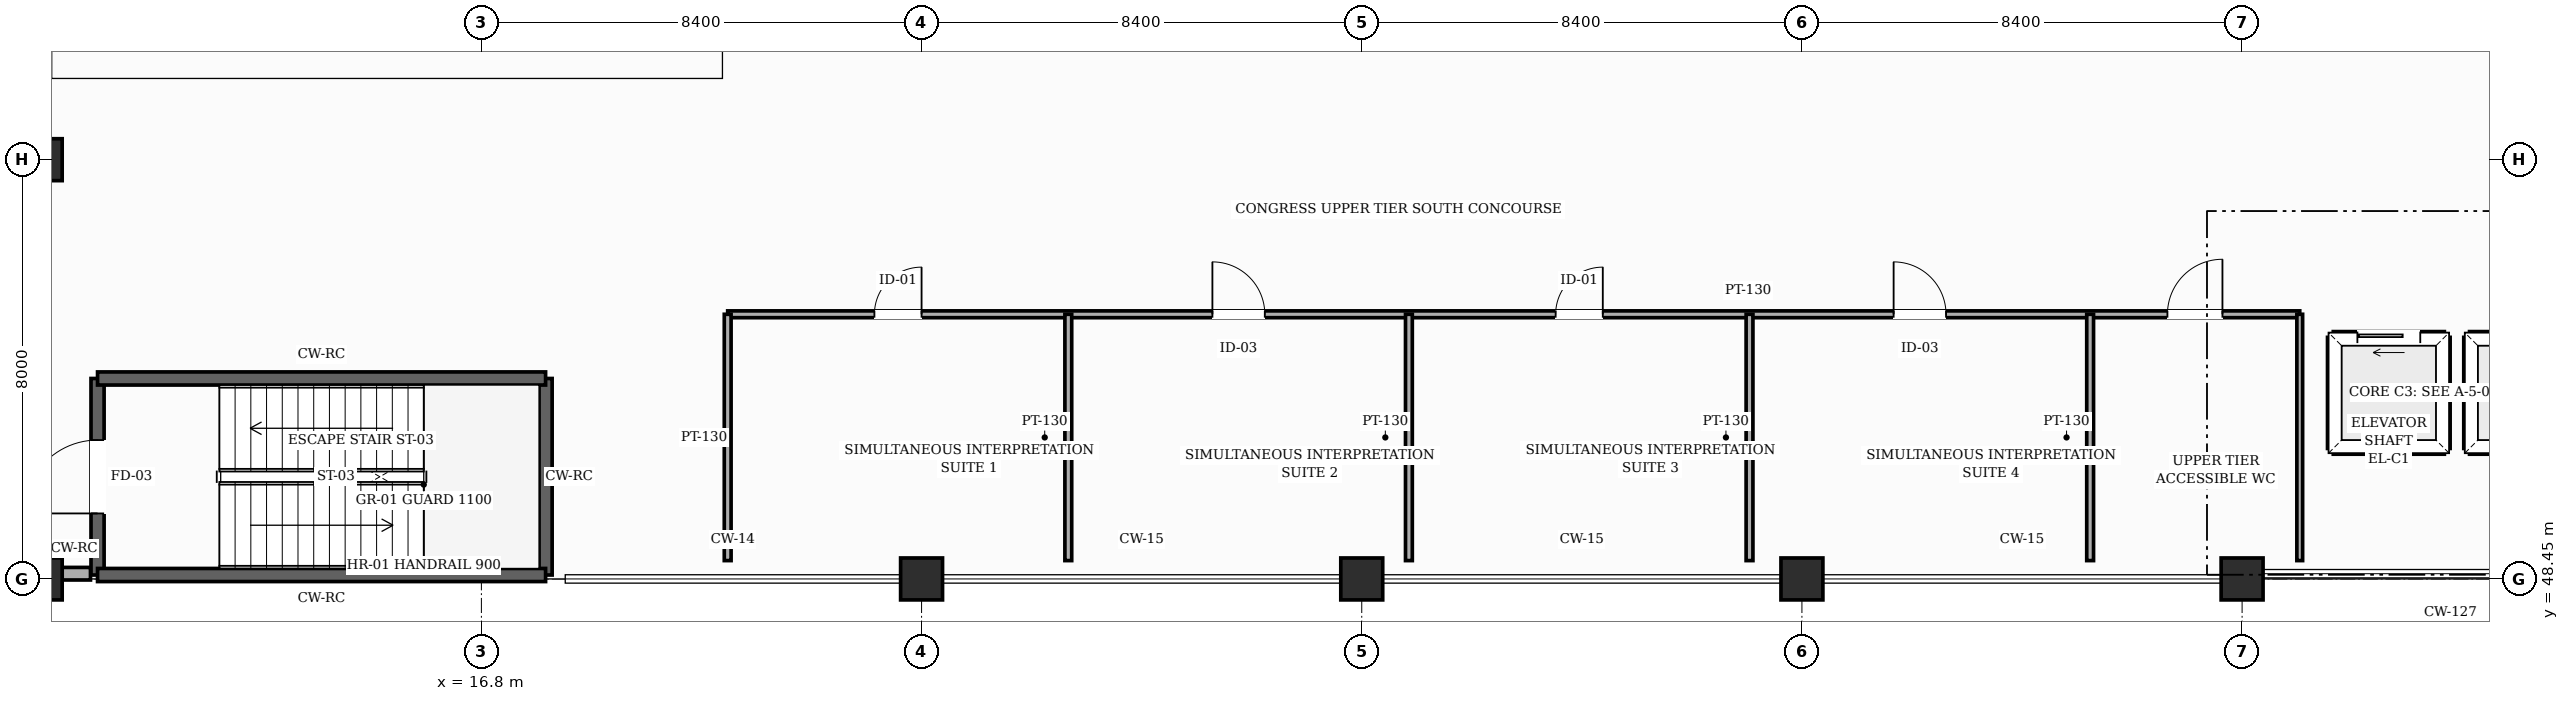
"""IFC4 building model, lengths in metres.
Left out: names, types, materials, properties, quantities, classifications, styles, units other than length and angle.
Written with IfcOpenShell. Run it as: python <this file> out.ifc"""

import sys

from ifc_helpers import new_model, si_unit, direction, frame, frame_2d, origin, origin_2d, place, context, subcontext, project, spatial, rectangle, hollow_rectangle, extrude, element, fill, save


model = new_model("IFC4")
c1 = context("Model", 3, precision=1e-05, world=origin(), true_north=direction((0.0, 1.0)))
c2 = subcontext(c1, "Body", "Model", "MODEL_VIEW")
j1 = project(units=[si_unit("LENGTHUNIT", "METRE"), si_unit("PLANEANGLEUNIT", "RADIAN")], contexts=[c1])
p1 = place(None, origin())
s1 = spatial("IfcSite", under=j1, at=p1, CompositionType="ELEMENT")
p2 = place(p1, origin())
s2 = spatial("IfcBuilding", under=s1, at=p2, CompositionType="ELEMENT")
p3 = place(p2, frame((0.0, 0.0, 10.2)))
s3 = spatial("IfcBuildingStorey", under=s2, at=p3, CompositionType="ELEMENT", Elevation=10.2)
for number, where, z_axis, x_axis in (
    (1, (8.4, 48.45, 0.0), (0.0, 0.0, 1.0), (1.0, 0.0, 0.0)),
    (2, (8.4, 56.45, 0.0), (0.0, 0.0, 1.0), (1.0, 0.0, 0.0)),
    (3, (25.2, 48.45, 0.0), (0.0, 0.0, 1.0), (1.0, 0.0, 0.0)),
    (4, (33.6, 48.45, 0.0), (0.0, 0.0, 1.0), (1.0, 0.0, 0.0)),
    (5, (42.0, 48.45, 0.0), (0.0, 0.0, 1.0), (1.0, 0.0, 0.0)),
    (6, (50.4, 48.45, 0.0), (0.0, 0.0, 1.0), (1.0, 0.0, 0.0)),
):
    element("IfcColumn", number, at=place(p3, frame(where, z_axis=z_axis, x_axis=x_axis)), inside=s3, PredefinedType="COLUMN", context=c2, shape_type="SweptSolid", body=[
        extrude(hollow_rectangle(XDim=0.8, YDim=0.8, WallThickness=0.032, InnerFilletRadius=0.032, OuterFilletRadius=0.064, at=origin_2d()), origin(), (0.0, 0.0, 1.0), 4.8),
    ])
p4 = place(p3, frame((9.34, 48.55, 0.0), z_axis=(0.0, 0.0, 1.0), x_axis=(-1.0, 0.0, 0.0)))
e7 = element("IfcWall", 7, at=p4, inside=s3, PredefinedType="SOLIDWALL", context=c2, shape_type="SweptSolid", body=[
    extrude(rectangle(XDim=0.54, YDim=0.24, at=frame_2d((0.27, 0.0))), origin(), (0.0, 0.0, 1.0), 3.535),
])
p5 = place(p3, frame((9.475, 48.525, 0.0), z_axis=(0.0, 0.0, 1.0), x_axis=(0.0, 1.0, 0.0)))
e8 = element("IfcWall", 8, at=p5, inside=s3, PredefinedType="SHEAR", context=c2, shape_type="SweptSolid", body=[
    extrude(rectangle(XDim=3.75, YDim=0.25, at=frame_2d((1.875, 0.0))), origin(), (0.0, 0.0, 1.0), 4.56),
])
p6 = place(p5, frame((1.175, 0.0, 0.0)))
e9 = element("IfcOpeningElement", 9, at=p6, cuts=e8, PredefinedType="OPENING", context=c2, shape_type="SweptSolid", body=[
    extrude(rectangle(XDim=1.4, YDim=2.25, at=frame_2d((0.7, 1.125))), frame((0.0, 0.135, 0.0), z_axis=(0.0, -1.0, 0.0), x_axis=(1.0, 0.0, 0.0)), (0.0, 0.0, 1.0), 0.27),
])
p7 = place(p3, frame((18.025, 52.275, 0.0), z_axis=(0.0, 0.0, 1.0), x_axis=(0.0, -1.0, 0.0)))
e10 = element("IfcWall", 10, at=p7, inside=s3, PredefinedType="SHEAR", context=c2, shape_type="SweptSolid", body=[
    extrude(rectangle(XDim=3.75, YDim=0.25, at=frame_2d((1.875, 0.0))), origin(), (0.0, 0.0, 1.0), 4.56),
])
for number, where, z_axis, x_axis in (
    (11, (18.025, 48.525, 0.0), (0.0, 0.0, 1.0), (-1.0, 0.0, 0.0)),
    (12, (9.475, 52.275, 0.0), (0.0, 0.0, 1.0), (1.0, 0.0, 0.0)),
):
    element("IfcWall", number, at=place(p3, frame(where, z_axis=z_axis, x_axis=x_axis)), inside=s3, PredefinedType="SHEAR", context=c2, shape_type="SweptSolid", body=[
        extrude(rectangle(XDim=8.55, YDim=0.25, at=frame_2d((4.275, 0.0))), origin(), (0.0, 0.0, 1.0), 4.56),
    ])
p8 = place(p3, frame((52.14, 53.06, 0.0), z_axis=(0.0, 0.0, 1.0), x_axis=(1.0, 0.0, 0.0)))
e13 = element("IfcWall", 13, at=p8, inside=s3, PredefinedType="SHEAR", context=c2, shape_type="SweptSolid", body=[
    extrude(rectangle(XDim=2.12, YDim=0.22, at=frame_2d((1.06, 0.0))), origin(), (0.0, 0.0, 1.0), 4.56),
])
p9 = place(p8, frame((0.46, 0.0, 0.0)))
e14 = element("IfcOpeningElement", 14, at=p9, cuts=e13, PredefinedType="OPENING", context=c2, shape_type="SweptSolid", body=[
    extrude(rectangle(XDim=1.2, YDim=2.25, at=frame_2d((0.6, 1.125))), frame((0.0, 0.12, 0.0), z_axis=(0.0, -1.0, 0.0), x_axis=(1.0, 0.0, 0.0)), (0.0, 0.0, 1.0), 0.24),
])
for number, where, z_axis, x_axis in (
    (15, (52.14, 50.94, 0.0), (0.0, 0.0, 1.0), (1.0, 0.0, 0.0)),
    (16, (54.26, 50.94, 0.0), (0.0, 0.0, 1.0), (0.0, 1.0, 0.0)),
    (17, (52.14, 50.94, 0.0), (0.0, 0.0, 1.0), (0.0, 1.0, 0.0)),
):
    element("IfcWall", number, at=place(p3, frame(where, z_axis=z_axis, x_axis=x_axis)), inside=s3, PredefinedType="SHEAR", context=c2, shape_type="SweptSolid", body=[
        extrude(rectangle(XDim=2.12, YDim=0.22, at=frame_2d((1.06, 0.0))), origin(), (0.0, 0.0, 1.0), 4.56),
    ])
p10 = place(p3, frame((54.74, 53.06, 0.0), z_axis=(0.0, 0.0, 1.0), x_axis=(1.0, 0.0, 0.0)))
e18 = element("IfcWall", 18, at=p10, inside=s3, PredefinedType="SHEAR", context=c2, shape_type="SweptSolid", body=[
    extrude(rectangle(XDim=2.12, YDim=0.22, at=frame_2d((1.06, 0.0))), origin(), (0.0, 0.0, 1.0), 4.56),
])
p11 = place(p10, frame((0.46, 0.0, 0.0)))
e19 = element("IfcOpeningElement", 19, at=p11, cuts=e18, PredefinedType="OPENING", context=c2, shape_type="SweptSolid", body=[
    extrude(rectangle(XDim=1.2, YDim=2.25, at=frame_2d((0.6, 1.125))), frame((0.0, 0.12, 0.0), z_axis=(0.0, -1.0, 0.0), x_axis=(1.0, 0.0, 0.0)), (0.0, 0.0, 1.0), 0.24),
])
for number, where, z_axis, x_axis in (
    (20, (54.74, 50.94, 0.0), (0.0, 0.0, 1.0), (1.0, 0.0, 0.0)),
    (21, (54.74, 50.94, 0.0), (0.0, 0.0, 1.0), (0.0, 1.0, 0.0)),
):
    element("IfcWall", number, at=place(p3, frame(where, z_axis=z_axis, x_axis=x_axis)), inside=s3, PredefinedType="SHEAR", context=c2, shape_type="SweptSolid", body=[
        extrude(rectangle(XDim=2.12, YDim=0.22, at=frame_2d((1.06, 0.0))), origin(), (0.0, 0.0, 1.0), 4.56),
    ])
p12 = place(p3, frame((21.5, 53.5, 0.0), z_axis=(0.0, 0.0, 1.0), x_axis=(1.0, 0.0, 0.0)))
e22 = element("IfcWall", 22, at=p12, inside=s3, PredefinedType="PARTITIONING", context=c2, shape_type="SweptSolid", body=[
    extrude(rectangle(XDim=30.0, YDim=0.13, at=frame_2d((15.0, 0.0))), origin(), (0.0, 0.0, 1.0), 4.545),
])
p13 = place(p12, frame((2.8, 0.0, 0.0)))
e23 = element("IfcOpeningElement", 23, at=p13, cuts=e22, PredefinedType="OPENING", context=c2, shape_type="SweptSolid", body=[
    extrude(rectangle(XDim=0.9, YDim=2.15, at=frame_2d((0.45, 1.075))), frame((0.0, 0.075, 0.0), z_axis=(0.0, -1.0, 0.0), x_axis=(1.0, 0.0, 0.0)), (0.0, 0.0, 1.0), 0.15),
])
p14 = place(p12, frame((9.25, 0.0, 0.0)))
e24 = element("IfcOpeningElement", 24, at=p14, cuts=e22, PredefinedType="OPENING", context=c2, shape_type="SweptSolid", body=[
    extrude(rectangle(XDim=1.0, YDim=2.18, at=frame_2d((0.5, 1.09))), frame((0.0, 0.075, 0.0), z_axis=(0.0, -1.0, 0.0), x_axis=(1.0, 0.0, 0.0)), (0.0, 0.0, 1.0), 0.15),
])
p15 = place(p12, frame((15.8, 0.0, 0.0)))
e25 = element("IfcOpeningElement", 25, at=p15, cuts=e22, PredefinedType="OPENING", context=c2, shape_type="SweptSolid", body=[
    extrude(rectangle(XDim=0.9, YDim=2.15, at=frame_2d((0.45, 1.075))), frame((0.0, 0.075, 0.0), z_axis=(0.0, -1.0, 0.0), x_axis=(1.0, 0.0, 0.0)), (0.0, 0.0, 1.0), 0.15),
])
p16 = place(p12, frame((22.25, 0.0, 0.0)))
e26 = element("IfcOpeningElement", 26, at=p16, cuts=e22, PredefinedType="OPENING", context=c2, shape_type="SweptSolid", body=[
    extrude(rectangle(XDim=1.0, YDim=2.18, at=frame_2d((0.5, 1.09))), frame((0.0, 0.075, 0.0), z_axis=(0.0, -1.0, 0.0), x_axis=(1.0, 0.0, 0.0)), (0.0, 0.0, 1.0), 0.15),
])
p17 = place(p12, frame((27.475, 0.0, 0.0)))
e27 = element("IfcOpeningElement", 27, at=p17, cuts=e22, PredefinedType="OPENING", context=c2, shape_type="SweptSolid", body=[
    extrude(rectangle(XDim=1.05, YDim=2.2, at=frame_2d((0.525, 1.1))), frame((0.0, 0.075, 0.0), z_axis=(0.0, -1.0, 0.0), x_axis=(1.0, 0.0, 0.0)), (0.0, 0.0, 1.0), 0.15),
])
for number, where, z_axis, x_axis in (
    (28, (21.5, 48.8, 0.0), (0.0, 0.0, 1.0), (0.0, 1.0, 0.0)),
    (29, (28.0, 48.8, 0.0), (0.0, 0.0, 1.0), (0.0, 1.0, 0.0)),
    (30, (34.5, 48.8, 0.0), (0.0, 0.0, 1.0), (0.0, 1.0, 0.0)),
    (31, (41.0, 48.8, 0.0), (0.0, 0.0, 1.0), (0.0, 1.0, 0.0)),
    (32, (47.5, 48.8, 0.0), (0.0, 0.0, 1.0), (0.0, 1.0, 0.0)),
):
    element("IfcWall", number, at=place(p3, frame(where, z_axis=z_axis, x_axis=x_axis)), inside=s3, PredefinedType="PARTITIONING", context=c2, shape_type="SweptSolid", body=[
        extrude(rectangle(XDim=4.7, YDim=0.13, at=frame_2d((2.35, 0.0))), origin(), (0.0, 0.0, 1.0), 4.545),
    ])
p18 = place(p3, frame((51.5, 48.8, 0.0), z_axis=(0.0, 0.0, 1.0), x_axis=(0.0, 1.0, 0.0)))
e33 = element("IfcWall", 33, at=p18, inside=s3, PredefinedType="PARTITIONING", context=c2, shape_type="SweptSolid", body=[
    extrude(rectangle(XDim=4.7, YDim=0.11, at=frame_2d((2.35, 0.0))), origin(), (0.0, 0.0, 1.0), 4.545),
])
p19 = place(p6, origin())
e34 = element("IfcDoor", 34, at=p19, inside=s3, OperationType="SINGLE_SWING_LEFT", PredefinedType="DOOR", context=c2, shape_type="SweptSolid", body=[
    extrude(rectangle(XDim=1.4, YDim=2.25, at=frame_2d((0.7, 1.125))), frame((0.0, 0.025, 0.0), z_axis=(0.0, -1.0, 0.0), x_axis=(1.0, 0.0, 0.0)), (0.0, 0.0, 1.0), 0.05),
])
fill(e9, e34)
p20 = place(p9, origin())
e35 = element("IfcDoor", 35, at=p20, inside=s3, OperationType="SLIDING_TO_LEFT", PredefinedType="DOOR", context=c2, shape_type="SweptSolid", body=[
    extrude(rectangle(XDim=1.2, YDim=2.25, at=frame_2d((0.6, 1.125))), frame((0.0, 0.025, 0.0), z_axis=(0.0, -1.0, 0.0), x_axis=(1.0, 0.0, 0.0)), (0.0, 0.0, 1.0), 0.05),
])
fill(e14, e35)
p21 = place(p13, origin())
e36 = element("IfcDoor", 36, at=p21, inside=s3, OperationType="SINGLE_SWING_RIGHT", PredefinedType="DOOR", context=c2, shape_type="SweptSolid", body=[
    extrude(rectangle(XDim=0.9, YDim=2.15, at=frame_2d((0.45, 1.075))), frame((0.0, 0.025, 0.0), z_axis=(0.0, -1.0, 0.0), x_axis=(1.0, 0.0, 0.0)), (0.0, 0.0, 1.0), 0.05),
])
fill(e23, e36)
p22 = place(p14, origin())
e37 = element("IfcDoor", 37, at=p22, inside=s3, OperationType="SINGLE_SWING_LEFT", PredefinedType="DOOR", context=c2, shape_type="SweptSolid", body=[
    extrude(rectangle(XDim=1.0, YDim=2.18, at=frame_2d((0.5, 1.09))), frame((0.0, 0.025, 0.0), z_axis=(0.0, -1.0, 0.0), x_axis=(1.0, 0.0, 0.0)), (0.0, 0.0, 1.0), 0.05),
])
fill(e24, e37)
p23 = place(p15, origin())
e38 = element("IfcDoor", 38, at=p23, inside=s3, OperationType="SINGLE_SWING_RIGHT", PredefinedType="DOOR", context=c2, shape_type="SweptSolid", body=[
    extrude(rectangle(XDim=0.9, YDim=2.15, at=frame_2d((0.45, 1.075))), frame((0.0, 0.025, 0.0), z_axis=(0.0, -1.0, 0.0), x_axis=(1.0, 0.0, 0.0)), (0.0, 0.0, 1.0), 0.05),
])
fill(e25, e38)
p24 = place(p16, origin())
e39 = element("IfcDoor", 39, at=p24, inside=s3, OperationType="SINGLE_SWING_LEFT", PredefinedType="DOOR", context=c2, shape_type="SweptSolid", body=[
    extrude(rectangle(XDim=1.0, YDim=2.18, at=frame_2d((0.5, 1.09))), frame((0.0, 0.025, 0.0), z_axis=(0.0, -1.0, 0.0), x_axis=(1.0, 0.0, 0.0)), (0.0, 0.0, 1.0), 0.05),
])
fill(e26, e39)
p25 = place(p17, origin())
e40 = element("IfcDoor", 40, at=p25, inside=s3, OperationType="SINGLE_SWING_RIGHT", PredefinedType="DOOR", context=c2, shape_type="SweptSolid", body=[
    extrude(rectangle(XDim=1.05, YDim=2.2, at=frame_2d((0.525, 1.1))), frame((0.0, 0.025, 0.0), z_axis=(0.0, -1.0, 0.0), x_axis=(1.0, 0.0, 0.0)), (0.0, 0.0, 1.0), 0.05),
])
fill(e27, e40)
save(model, sys.argv[1])
